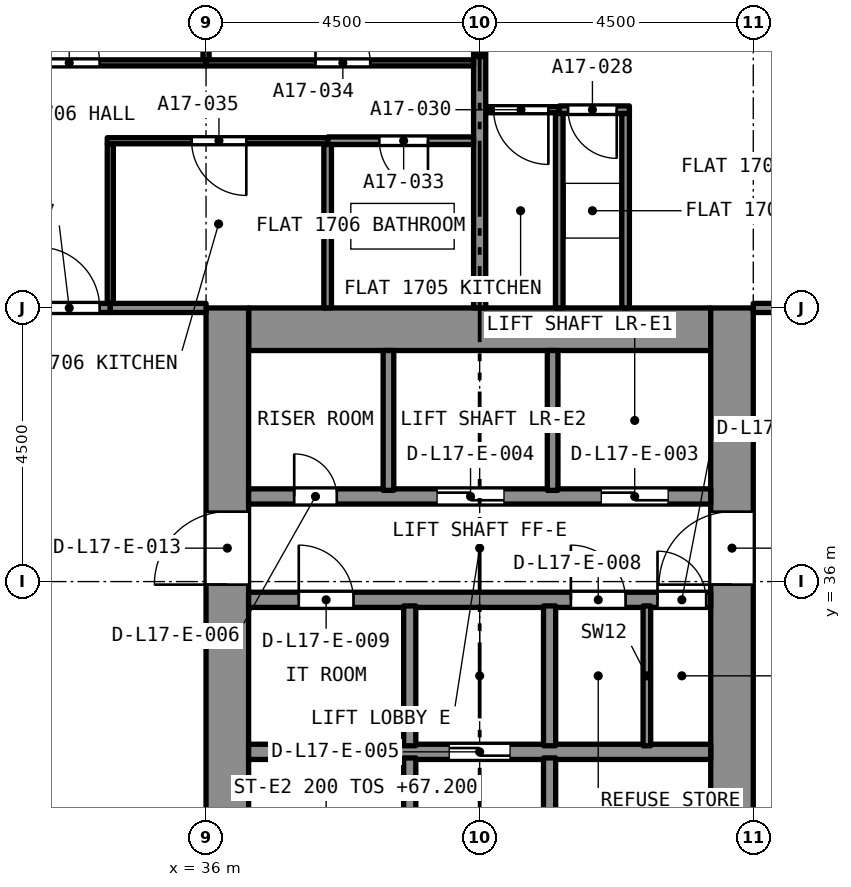
"""IFC4 building model, lengths in metres.
Left out: names, types, materials, properties, quantities, classifications, styles, units other than length and angle.
Written with IfcOpenShell. Run it as: python <this file> out.ifc"""

import sys

from ifc_helpers import new_model, si_unit, direction, frame, frame_2d, origin, place, context, subcontext, project, spatial, rectangle, extrude, element, fill, save


model = new_model("IFC4")
c1 = context("Model", 3, precision=1e-05, world=origin(), true_north=direction((0.0, 1.0)))
c2 = subcontext(c1, "Body", "Model", "MODEL_VIEW")
j1 = project(units=[si_unit("LENGTHUNIT", "METRE"), si_unit("PLANEANGLEUNIT", "RADIAN")], contexts=[c1])
p1 = place(None, origin())
s1 = spatial("IfcSite", under=j1, at=p1, CompositionType="ELEMENT")
p2 = place(p1, origin())
s2 = spatial("IfcBuilding", under=s1, at=p2, CompositionType="ELEMENT")
p3 = place(p2, frame((0.0, 0.0, 65.6)))
s3 = spatial("IfcBuildingStorey", under=s2, at=p3, CompositionType="ELEMENT", Elevation=65.6)
p4 = place(p3, frame((36.7, 40.15, 0.0), z_axis=(0.0, 0.0, 1.0), x_axis=(1.0, 0.0, 0.0)))
e1 = element("IfcWall", 1, at=p4, inside=s3, PredefinedType="SOLIDWALL", context=c2, shape_type="SweptSolid", body=[
    extrude(rectangle(XDim=7.6, YDim=0.7, at=frame_2d((3.8, 0.0))), origin(), (0.0, 0.0, 1.0), 3.2),
])
p5 = place(p3, frame((36.35, 27.0, 0.0), z_axis=(0.0, 0.0, 1.0), x_axis=(0.0, 1.0, 0.0)))
e2 = element("IfcWall", 2, at=p5, inside=s3, PredefinedType="SOLIDWALL", context=c2, shape_type="SweptSolid", body=[
    extrude(rectangle(XDim=13.5, YDim=0.7, at=frame_2d((6.75, 0.0))), origin(), (0.0, 0.0, 1.0), 3.2),
])
p6 = place(p5, frame((8.95, 0.0, 0.0)))
e3 = element("IfcOpeningElement", 3, at=p6, cuts=e2, PredefinedType="OPENING", context=c2, shape_type="SweptSolid", body=[
    extrude(rectangle(XDim=1.2, YDim=2.1, at=frame_2d((0.6, 1.05))), frame((0.0, 0.36, 0.0), z_axis=(0.0, -1.0, 0.0), x_axis=(1.0, 0.0, 0.0)), (0.0, 0.0, 1.0), 0.72),
])
p7 = place(p3, frame((44.65, 27.0, 0.0), z_axis=(0.0, 0.0, 1.0), x_axis=(0.0, 1.0, 0.0)))
e4 = element("IfcWall", 4, at=p7, inside=s3, PredefinedType="SOLIDWALL", context=c2, shape_type="SweptSolid", body=[
    extrude(rectangle(XDim=13.5, YDim=0.7, at=frame_2d((6.75, 0.0))), origin(), (0.0, 0.0, 1.0), 3.2),
])
p8 = place(p7, frame((8.95, 0.0, 0.0)))
e5 = element("IfcOpeningElement", 5, at=p8, cuts=e4, PredefinedType="OPENING", context=c2, shape_type="SweptSolid", body=[
    extrude(rectangle(XDim=1.2, YDim=2.1, at=frame_2d((0.6, 1.05))), frame((0.0, 0.36, 0.0), z_axis=(0.0, -1.0, 0.0), x_axis=(1.0, 0.0, 0.0)), (0.0, 0.0, 1.0), 0.72),
])
p9 = place(p3, frame((42.962, 43.76, 0.0), z_axis=(0.0, 0.0, 1.0), x_axis=(-1.0, 0.0, 0.0)))
e6 = element("IfcWall", 6, at=p9, inside=s3, PredefinedType="PARTITIONING", context=c2, shape_type="SweptSolid", body=[
    extrude(rectangle(XDim=1.153, YDim=0.125, at=frame_2d((0.577, 0.0))), origin(), (0.0, 0.0, 1.0), 2.9),
])
p10 = place(p9, frame((0.208, 0.0, 0.0)))
e7 = element("IfcOpeningElement", 7, at=p10, cuts=e6, PredefinedType="OPENING", context=c2, shape_type="SweptSolid", body=[
    extrude(rectangle(XDim=0.8, YDim=2.1, at=frame_2d((0.4, 1.05))), frame((0.0, 0.073, 0.0), z_axis=(0.0, -1.0, 0.0), x_axis=(1.0, 0.0, 0.0)), (0.0, 0.0, 1.0), 0.145),
])
for number, where, z_axis, x_axis in (
    (8, (42.9, 40.5, 0.0), (0.0, 0.0, 1.0), (0.0, 1.0, 0.0)),
    (9, (41.809, 40.5, 0.0), (0.0, 0.0, 1.0), (0.0, 1.0, 0.0)),
):
    element("IfcWall", number, at=place(p3, frame(where, z_axis=z_axis, x_axis=x_axis)), inside=s3, PredefinedType="PARTITIONING", context=c2, shape_type="SweptSolid", body=[
        extrude(rectangle(XDim=3.198, YDim=0.125, at=frame_2d((1.599, 0.0))), origin(), (0.0, 0.0, 1.0), 2.9),
    ])
p11 = place(p3, frame((41.809, 43.76, 0.0), z_axis=(0.0, 0.0, 1.0), x_axis=(-1.0, 0.0, 0.0)))
e10 = element("IfcWall", 10, at=p11, inside=s3, PredefinedType="PARTITIONING", context=c2, shape_type="SweptSolid", body=[
    extrude(rectangle(XDim=1.209, YDim=0.1, at=frame_2d((0.604, 0.0))), origin(), (0.0, 0.0, 1.0), 2.9),
])
p12 = place(p11, frame((0.179, 0.0, 0.0)))
e11 = element("IfcOpeningElement", 11, at=p12, cuts=e10, PredefinedType="OPENING", context=c2, shape_type="SweptSolid", body=[
    extrude(rectangle(XDim=0.9, YDim=2.1, at=frame_2d((0.45, 1.05))), frame((0.0, 0.06, 0.0), z_axis=(0.0, -1.0, 0.0), x_axis=(1.0, 0.0, 0.0)), (0.0, 0.0, 1.0), 0.12),
])
p13 = place(p3, frame((45.0, 40.5, 0.0), z_axis=(0.0, 0.0, 1.0), x_axis=(1.0, 0.0, 0.0)))
e12 = element("IfcWall", 12, at=p13, inside=s3, PredefinedType="PARTITIONING", context=c2, shape_type="SweptSolid", body=[
    extrude(rectangle(XDim=3.8, YDim=0.15, at=frame_2d((1.9, 0.0))), origin(), (0.0, 0.0, 1.0), 2.9),
])
p14 = place(p13, frame((1.75, 0.0, 0.0)))
e13 = element("IfcOpeningElement", 13, at=p14, cuts=e12, PredefinedType="OPENING", context=c2, shape_type="SweptSolid", body=[
    extrude(rectangle(XDim=1.0, YDim=2.1, at=frame_2d((0.5, 1.05))), frame((0.0, 0.085, 0.0), z_axis=(0.0, -1.0, 0.0), x_axis=(1.0, 0.0, 0.0)), (0.0, 0.0, 1.0), 0.17),
])
p15 = place(p3, frame((40.5, 40.5, 0.0), z_axis=(0.0, 0.0, 1.0), x_axis=(0.0, 1.0, 0.0)))
e14 = element("IfcWall", 14, at=p15, inside=s3, PredefinedType="PARTITIONING", context=c2, shape_type="SweptSolid", body=[
    extrude(rectangle(XDim=8.3, YDim=0.2, at=frame_2d((4.15, 0.0))), origin(), (0.0, 0.0, 1.0), 2.9),
])
p16 = place(p3, frame((40.4, 43.25, 0.0), z_axis=(0.0, 0.0, 1.0), x_axis=(-1.0, 0.0, 0.0)))
e15 = element("IfcWall", 15, at=p16, inside=s3, PredefinedType="PARTITIONING", context=c2, shape_type="SweptSolid", body=[
    extrude(rectangle(XDim=2.4, YDim=0.125, at=frame_2d((1.2, 0.0))), origin(), (0.0, 0.0, 1.0), 2.9),
])
p17 = place(p16, frame((0.75, 0.0, 0.0)))
e16 = element("IfcOpeningElement", 16, at=p17, cuts=e15, PredefinedType="OPENING", context=c2, shape_type="SweptSolid", body=[
    extrude(rectangle(XDim=0.8, YDim=2.1, at=frame_2d((0.4, 1.05))), frame((0.0, 0.073, 0.0), z_axis=(0.0, -1.0, 0.0), x_axis=(1.0, 0.0, 0.0)), (0.0, 0.0, 1.0), 0.145),
])
p18 = place(p3, frame((38.0, 40.5, 0.0), z_axis=(0.0, 0.0, 1.0), x_axis=(0.0, 1.0, 0.0)))
e17 = element("IfcWall", 17, at=p18, inside=s3, PredefinedType="PARTITIONING", context=c2, shape_type="SweptSolid", body=[
    extrude(rectangle(XDim=2.688, YDim=0.125, at=frame_2d((1.344, 0.0))), origin(), (0.0, 0.0, 1.0), 2.9),
])
p19 = place(p3, frame((36.0, 44.53, 0.0), z_axis=(0.0, 0.0, 1.0), x_axis=(1.0, 0.0, 0.0)))
e18 = element("IfcWall", 18, at=p19, inside=s3, PredefinedType="PARTITIONING", context=c2, shape_type="SweptSolid", body=[
    extrude(rectangle(XDim=4.4, YDim=0.1, at=frame_2d((2.2, 0.0))), origin(), (0.0, 0.0, 1.0), 2.9),
])
p20 = place(p19, frame((1.8, 0.0, 0.0)))
e19 = element("IfcOpeningElement", 19, at=p20, cuts=e18, PredefinedType="OPENING", context=c2, shape_type="SweptSolid", body=[
    extrude(rectangle(XDim=0.9, YDim=2.1, at=frame_2d((0.45, 1.05))), frame((0.0, 0.06, 0.0), z_axis=(0.0, -1.0, 0.0), x_axis=(1.0, 0.0, 0.0)), (0.0, 0.0, 1.0), 0.12),
])
p21 = place(p3, frame((36.0, 44.58, 0.0), z_axis=(0.0, 0.0, 1.0), x_axis=(0.0, 1.0, 0.0)))
e20 = element("IfcWall", 20, at=p21, inside=s3, PredefinedType="PARTITIONING", context=c2, shape_type="SweptSolid", body=[
    extrude(rectangle(XDim=4.22, YDim=0.1, at=frame_2d((2.11, 0.0))), origin(), (0.0, 0.0, 1.0), 2.9),
])
p22 = place(p3, frame((38.0, 43.25, 0.0), z_axis=(0.0, 0.0, 1.0), x_axis=(-1.0, 0.0, 0.0)))
e21 = element("IfcWall", 21, at=p22, inside=s3, PredefinedType="PARTITIONING", context=c2, shape_type="SweptSolid", body=[
    extrude(rectangle(XDim=3.625, YDim=0.1, at=frame_2d((1.812, 0.0))), origin(), (0.0, 0.0, 1.0), 2.9),
])
p23 = place(p22, frame((1.337, 0.0, 0.0)))
e22 = element("IfcOpeningElement", 22, at=p23, cuts=e21, PredefinedType="OPENING", context=c2, shape_type="SweptSolid", body=[
    extrude(rectangle(XDim=0.9, YDim=2.1, at=frame_2d((0.45, 1.05))), frame((0.0, 0.06, 0.0), z_axis=(0.0, -1.0, 0.0), x_axis=(1.0, 0.0, 0.0)), (0.0, 0.0, 1.0), 0.12),
])
p24 = place(p3, frame((34.425, 40.575, 0.0), z_axis=(0.0, 0.0, 1.0), x_axis=(0.0, 1.0, 0.0)))
e23 = element("IfcWall", 23, at=p24, inside=s3, PredefinedType="PARTITIONING", context=c2, shape_type="SweptSolid", body=[
    extrude(rectangle(XDim=2.625, YDim=0.1, at=frame_2d((1.312, 0.0))), origin(), (0.0, 0.0, 1.0), 2.9),
])
p25 = place(p3, frame((32.2, 44.53, 0.0), z_axis=(0.0, 0.0, 1.0), x_axis=(1.0, 0.0, 0.0)))
e24 = element("IfcWall", 24, at=p25, inside=s3, PredefinedType="PARTITIONING", context=c2, shape_type="SweptSolid", body=[
    extrude(rectangle(XDim=3.8, YDim=0.1, at=frame_2d((1.9, 0.0))), origin(), (0.0, 0.0, 1.0), 2.9),
])
p26 = place(p25, frame((1.05, 0.0, 0.0)))
e25 = element("IfcOpeningElement", 25, at=p26, cuts=e24, PredefinedType="OPENING", context=c2, shape_type="SweptSolid", body=[
    extrude(rectangle(XDim=1.0, YDim=2.1, at=frame_2d((0.5, 1.05))), frame((0.0, 0.06, 0.0), z_axis=(0.0, -1.0, 0.0), x_axis=(1.0, 0.0, 0.0)), (0.0, 0.0, 1.0), 0.12),
])
p27 = place(p3, frame((32.2, 40.5, 0.0), z_axis=(0.0, 0.0, 1.0), x_axis=(1.0, 0.0, 0.0)))
e26 = element("IfcWall", 26, at=p27, inside=s3, PredefinedType="PARTITIONING", context=c2, shape_type="SweptSolid", body=[
    extrude(rectangle(XDim=2.225, YDim=0.15, at=frame_2d((1.113, 0.0))), origin(), (0.0, 0.0, 1.0), 2.9),
])
p28 = place(p27, frame((1.05, 0.0, 0.0)))
e27 = element("IfcOpeningElement", 27, at=p28, cuts=e26, PredefinedType="OPENING", context=c2, shape_type="SweptSolid", body=[
    extrude(rectangle(XDim=1.0, YDim=2.1, at=frame_2d((0.5, 1.05))), frame((0.0, 0.085, 0.0), z_axis=(0.0, -1.0, 0.0), x_axis=(1.0, 0.0, 0.0)), (0.0, 0.0, 1.0), 0.17),
])
p29 = place(p3, frame((34.425, 40.5, 0.0), z_axis=(0.0, 0.0, 1.0), x_axis=(1.0, 0.0, 0.0)))
e28 = element("IfcWall", 28, at=p29, inside=s3, PredefinedType="PARTITIONING", context=c2, shape_type="SweptSolid", body=[
    extrude(rectangle(XDim=1.575, YDim=0.15, at=frame_2d((0.788, 0.0))), origin(), (0.0, 0.0, 1.0), 2.9),
])
p30 = place(p3, frame((36.7, 33.2, 0.0), z_axis=(0.0, 0.0, 1.0), x_axis=(1.0, 0.0, 0.0)))
e29 = element("IfcWall", 29, at=p30, inside=s3, PredefinedType="SOLIDWALL", context=c2, shape_type="SweptSolid", body=[
    extrude(rectangle(XDim=7.6, YDim=0.25, at=frame_2d((3.8, 0.0))), origin(), (0.0, 0.0, 1.0), 2.9),
])
p31 = place(p30, frame((3.3, 0.0, 0.0)))
e30 = element("IfcOpeningElement", 30, at=p31, cuts=e29, PredefinedType="OPENING", context=c2, shape_type="SweptSolid", body=[
    extrude(rectangle(XDim=1.0, YDim=2.1, at=frame_2d((0.5, 1.05))), frame((0.0, 0.135, 0.0), z_axis=(0.0, -1.0, 0.0), x_axis=(1.0, 0.0, 0.0)), (0.0, 0.0, 1.0), 0.27),
])
p32 = place(p3, frame((36.7, 35.7, 0.0), z_axis=(0.0, 0.0, 1.0), x_axis=(1.0, 0.0, 0.0)))
e31 = element("IfcWall", 31, at=p32, inside=s3, PredefinedType="SOLIDWALL", context=c2, shape_type="SweptSolid", body=[
    extrude(rectangle(XDim=7.6, YDim=0.25, at=frame_2d((3.8, 0.0))), origin(), (0.0, 0.0, 1.0), 2.9),
])
p33 = place(p32, frame((6.725, 0.0, 0.0)))
e32 = element("IfcOpeningElement", 32, at=p33, cuts=e31, PredefinedType="OPENING", context=c2, shape_type="SweptSolid", body=[
    extrude(rectangle(XDim=0.8, YDim=2.1, at=frame_2d((0.4, 1.05))), frame((0.0, 0.135, 0.0), z_axis=(0.0, -1.0, 0.0), x_axis=(1.0, 0.0, 0.0)), (0.0, 0.0, 1.0), 0.27),
])
p34 = place(p32, frame((5.3, 0.0, 0.0)))
e33 = element("IfcOpeningElement", 33, at=p34, cuts=e31, PredefinedType="OPENING", context=c2, shape_type="SweptSolid", body=[
    extrude(rectangle(XDim=0.9, YDim=2.1, at=frame_2d((0.45, 1.05))), frame((0.0, 0.135, 0.0), z_axis=(0.0, -1.0, 0.0), x_axis=(1.0, 0.0, 0.0)), (0.0, 0.0, 1.0), 0.27),
])
p35 = place(p32, frame((0.825, 0.0, 0.0)))
e34 = element("IfcOpeningElement", 34, at=p35, cuts=e31, PredefinedType="OPENING", context=c2, shape_type="SweptSolid", body=[
    extrude(rectangle(XDim=0.9, YDim=2.1, at=frame_2d((0.45, 1.05))), frame((0.0, 0.135, 0.0), z_axis=(0.0, -1.0, 0.0), x_axis=(1.0, 0.0, 0.0)), (0.0, 0.0, 1.0), 0.27),
])
p36 = place(p3, frame((36.7, 37.4, 0.0), z_axis=(0.0, 0.0, 1.0), x_axis=(1.0, 0.0, 0.0)))
e35 = element("IfcWall", 35, at=p36, inside=s3, PredefinedType="SOLIDWALL", context=c2, shape_type="SweptSolid", body=[
    extrude(rectangle(XDim=7.6, YDim=0.25, at=frame_2d((3.8, 0.0))), origin(), (0.0, 0.0, 1.0), 2.9),
])
p37 = place(p36, frame((5.8, 0.0, 0.0)))
e36 = element("IfcOpeningElement", 36, at=p37, cuts=e35, PredefinedType="OPENING", context=c2, shape_type="SweptSolid", body=[
    extrude(rectangle(XDim=1.1, YDim=2.4, at=frame_2d((0.55, 1.2))), frame((0.0, 0.135, 0.0), z_axis=(0.0, -1.0, 0.0), x_axis=(1.0, 0.0, 0.0)), (0.0, 0.0, 1.0), 0.27),
])
p38 = place(p36, frame((3.1, 0.0, 0.0)))
e37 = element("IfcOpeningElement", 37, at=p38, cuts=e35, PredefinedType="OPENING", context=c2, shape_type="SweptSolid", body=[
    extrude(rectangle(XDim=1.1, YDim=2.4, at=frame_2d((0.55, 1.2))), frame((0.0, 0.135, 0.0), z_axis=(0.0, -1.0, 0.0), x_axis=(1.0, 0.0, 0.0)), (0.0, 0.0, 1.0), 0.27),
])
p39 = place(p36, frame((0.75, 0.0, 0.0)))
e38 = element("IfcOpeningElement", 38, at=p39, cuts=e35, PredefinedType="OPENING", context=c2, shape_type="SweptSolid", body=[
    extrude(rectangle(XDim=0.7, YDim=2.1, at=frame_2d((0.35, 1.05))), frame((0.0, 0.135, 0.0), z_axis=(0.0, -1.0, 0.0), x_axis=(1.0, 0.0, 0.0)), (0.0, 0.0, 1.0), 0.27),
])
p40 = place(p3, frame((41.65, 27.7, 0.0), z_axis=(0.0, 0.0, 1.0), x_axis=(0.0, 1.0, 0.0)))
e39 = element("IfcWall", 39, at=p40, inside=s3, PredefinedType="SOLIDWALL", context=c2, shape_type="SweptSolid", body=[
    extrude(rectangle(XDim=5.4, YDim=0.2, at=frame_2d((2.7, 0.0))), origin(), (0.0, 0.0, 1.0), 2.9),
])
p41 = place(p40, frame((0.2, 0.0, 0.0)))
e40 = element("IfcOpeningElement", 40, at=p41, cuts=e39, PredefinedType="OPENING", context=c2, shape_type="SweptSolid", body=[
    extrude(rectangle(XDim=0.9, YDim=2.1, at=frame_2d((0.45, 1.05))), frame((0.0, 0.11, 0.0), z_axis=(0.0, -1.0, 0.0), x_axis=(1.0, 0.0, 0.0)), (0.0, 0.0, 1.0), 0.22),
])
p42 = place(p3, frame((39.35, 27.7, 0.0), z_axis=(0.0, 0.0, 1.0), x_axis=(0.0, 1.0, 0.0)))
e41 = element("IfcWall", 41, at=p42, inside=s3, PredefinedType="SOLIDWALL", context=c2, shape_type="SweptSolid", body=[
    extrude(rectangle(XDim=5.4, YDim=0.2, at=frame_2d((2.7, 0.0))), origin(), (0.0, 0.0, 1.0), 2.9),
])
p43 = place(p42, frame((0.2, 0.0, 0.0)))
e42 = element("IfcOpeningElement", 42, at=p43, cuts=e41, PredefinedType="OPENING", context=c2, shape_type="SweptSolid", body=[
    extrude(rectangle(XDim=0.9, YDim=2.1, at=frame_2d((0.45, 1.05))), frame((0.0, 0.11, 0.0), z_axis=(0.0, -1.0, 0.0), x_axis=(1.0, 0.0, 0.0)), (0.0, 0.0, 1.0), 0.22),
])
for number, where, z_axis, x_axis in (
    (43, (41.65, 33.3, 0.0), (0.0, 0.0, 1.0), (0.0, 1.0, 0.0)),
    (44, (39.35, 33.3, 0.0), (0.0, 0.0, 1.0), (0.0, 1.0, 0.0)),
):
    element("IfcWall", number, at=place(p3, frame(where, z_axis=z_axis, x_axis=x_axis)), inside=s3, PredefinedType="SOLIDWALL", context=c2, shape_type="SweptSolid", body=[
        extrude(rectangle(XDim=2.3, YDim=0.2, at=frame_2d((1.15, 0.0))), origin(), (0.0, 0.0, 1.0), 2.9),
    ])
for number, where, z_axis, x_axis in (
    (45, (41.7, 37.5, 0.0), (0.0, 0.0, 1.0), (0.0, 1.0, 0.0)),
    (46, (39.0, 37.5, 0.0), (0.0, 0.0, 1.0), (0.0, 1.0, 0.0)),
):
    element("IfcWall", number, at=place(p3, frame(where, z_axis=z_axis, x_axis=x_axis)), inside=s3, PredefinedType="SOLIDWALL", context=c2, shape_type="SweptSolid", body=[
        extrude(rectangle(XDim=2.3, YDim=0.175, at=frame_2d((1.15, 0.0))), origin(), (0.0, 0.0, 1.0), 2.9),
    ])
p44 = place(p3, frame((43.25, 33.3, 0.0), z_axis=(0.0, 0.0, 1.0), x_axis=(0.0, 1.0, 0.0)))
e47 = element("IfcWall", 47, at=p44, inside=s3, PredefinedType="PARTITIONING", context=c2, shape_type="SweptSolid", body=[
    extrude(rectangle(XDim=2.3, YDim=0.125, at=frame_2d((1.15, 0.0))), origin(), (0.0, 0.0, 1.0), 2.9),
])
p45 = place(p10, origin())
e48 = element("IfcDoor", 48, at=p45, inside=s3, OperationType="SINGLE_SWING_RIGHT", PredefinedType="DOOR", context=c2, shape_type="SweptSolid", body=[
    extrude(rectangle(XDim=0.8, YDim=2.1, at=frame_2d((0.4, 1.05))), frame((0.0, 0.025, 0.0), z_axis=(0.0, -1.0, 0.0), x_axis=(1.0, 0.0, 0.0)), (0.0, 0.0, 1.0), 0.05),
])
fill(e7, e48)
p46 = place(p12, origin())
e49 = element("IfcDoor", 49, at=p46, inside=s3, OperationType="SINGLE_SWING_RIGHT", PredefinedType="DOOR", context=c2, shape_type="SweptSolid", body=[
    extrude(rectangle(XDim=0.9, YDim=2.1, at=frame_2d((0.45, 1.05))), frame((0.0, 0.025, 0.0), z_axis=(0.0, -1.0, 0.0), x_axis=(1.0, 0.0, 0.0)), (0.0, 0.0, 1.0), 0.05),
])
fill(e11, e49)
p47 = place(p17, origin())
e50 = element("IfcDoor", 50, at=p47, inside=s3, OperationType="SINGLE_SWING_LEFT", PredefinedType="DOOR", context=c2, shape_type="SweptSolid", body=[
    extrude(rectangle(XDim=0.8, YDim=2.1, at=frame_2d((0.4, 1.05))), frame((0.0, 0.025, 0.0), z_axis=(0.0, -1.0, 0.0), x_axis=(1.0, 0.0, 0.0)), (0.0, 0.0, 1.0), 0.05),
])
fill(e16, e50)
p48 = place(p20, origin())
e51 = element("IfcDoor", 51, at=p48, inside=s3, OperationType="SINGLE_SWING_RIGHT", PredefinedType="DOOR", context=c2, shape_type="SweptSolid", body=[
    extrude(rectangle(XDim=0.9, YDim=2.1, at=frame_2d((0.45, 1.05))), frame((0.0, 0.025, 0.0), z_axis=(0.0, -1.0, 0.0), x_axis=(1.0, 0.0, 0.0)), (0.0, 0.0, 1.0), 0.05),
])
fill(e19, e51)
p49 = place(p23, origin())
e52 = element("IfcDoor", 52, at=p49, inside=s3, OperationType="SINGLE_SWING_LEFT", PredefinedType="DOOR", context=c2, shape_type="SweptSolid", body=[
    extrude(rectangle(XDim=0.9, YDim=2.1, at=frame_2d((0.45, 1.05))), frame((0.0, 0.025, 0.0), z_axis=(0.0, -1.0, 0.0), x_axis=(1.0, 0.0, 0.0)), (0.0, 0.0, 1.0), 0.05),
])
fill(e22, e52)
p50 = place(p26, origin())
e53 = element("IfcDoor", 53, at=p50, inside=s3, OperationType="SINGLE_SWING_LEFT", PredefinedType="DOOR", context=c2, shape_type="SweptSolid", body=[
    extrude(rectangle(XDim=1.0, YDim=2.1, at=frame_2d((0.5, 1.05))), frame((0.0, 0.025, 0.0), z_axis=(0.0, -1.0, 0.0), x_axis=(1.0, 0.0, 0.0)), (0.0, 0.0, 1.0), 0.05),
])
fill(e25, e53)
p51 = place(p28, origin())
e54 = element("IfcDoor", 54, at=p51, inside=s3, OperationType="SINGLE_SWING_RIGHT", PredefinedType="DOOR", context=c2, shape_type="SweptSolid", body=[
    extrude(rectangle(XDim=1.0, YDim=2.1, at=frame_2d((0.5, 1.05))), frame((0.0, 0.025, 0.0), z_axis=(0.0, -1.0, 0.0), x_axis=(1.0, 0.0, 0.0)), (0.0, 0.0, 1.0), 0.05),
])
fill(e27, e54)
p52 = place(p37, origin())
e55 = element("IfcDoor", 55, at=p52, inside=s3, OperationType="SLIDING_TO_LEFT", PredefinedType="DOOR", context=c2, shape_type="SweptSolid", body=[
    extrude(rectangle(XDim=1.1, YDim=2.4, at=frame_2d((0.55, 1.2))), frame((0.0, 0.025, 0.0), z_axis=(0.0, -1.0, 0.0), x_axis=(1.0, 0.0, 0.0)), (0.0, 0.0, 1.0), 0.05),
])
fill(e36, e55)
p53 = place(p38, origin())
e56 = element("IfcDoor", 56, at=p53, inside=s3, OperationType="SLIDING_TO_LEFT", PredefinedType="DOOR", context=c2, shape_type="SweptSolid", body=[
    extrude(rectangle(XDim=1.1, YDim=2.4, at=frame_2d((0.55, 1.2))), frame((0.0, 0.025, 0.0), z_axis=(0.0, -1.0, 0.0), x_axis=(1.0, 0.0, 0.0)), (0.0, 0.0, 1.0), 0.05),
])
fill(e37, e56)
p54 = place(p31, origin())
e57 = element("IfcDoor", 57, at=p54, inside=s3, OperationType="SLIDING_TO_LEFT", PredefinedType="DOOR", context=c2, shape_type="SweptSolid", body=[
    extrude(rectangle(XDim=1.0, YDim=2.1, at=frame_2d((0.5, 1.05))), frame((0.0, 0.025, 0.0), z_axis=(0.0, -1.0, 0.0), x_axis=(1.0, 0.0, 0.0)), (0.0, 0.0, 1.0), 0.05),
])
fill(e30, e57)
p55 = place(p39, origin())
e58 = element("IfcDoor", 58, at=p55, inside=s3, OperationType="SINGLE_SWING_LEFT", PredefinedType="DOOR", context=c2, shape_type="SweptSolid", body=[
    extrude(rectangle(XDim=0.7, YDim=2.1, at=frame_2d((0.35, 1.05))), frame((0.0, 0.025, 0.0), z_axis=(0.0, -1.0, 0.0), x_axis=(1.0, 0.0, 0.0)), (0.0, 0.0, 1.0), 0.05),
])
fill(e38, e58)
p56 = place(p33, origin())
e59 = element("IfcDoor", 59, at=p56, inside=s3, OperationType="SINGLE_SWING_LEFT", PredefinedType="DOOR", context=c2, shape_type="SweptSolid", body=[
    extrude(rectangle(XDim=0.8, YDim=2.1, at=frame_2d((0.4, 1.05))), frame((0.0, 0.025, 0.0), z_axis=(0.0, -1.0, 0.0), x_axis=(1.0, 0.0, 0.0)), (0.0, 0.0, 1.0), 0.05),
])
fill(e32, e59)
p57 = place(p34, origin())
e60 = element("IfcDoor", 60, at=p57, inside=s3, OperationType="SINGLE_SWING_LEFT", PredefinedType="DOOR", context=c2, shape_type="SweptSolid", body=[
    extrude(rectangle(XDim=0.9, YDim=2.1, at=frame_2d((0.45, 1.05))), frame((0.0, 0.025, 0.0), z_axis=(0.0, -1.0, 0.0), x_axis=(1.0, 0.0, 0.0)), (0.0, 0.0, 1.0), 0.05),
])
fill(e33, e60)
p58 = place(p35, origin())
e61 = element("IfcDoor", 61, at=p58, inside=s3, OperationType="SINGLE_SWING_LEFT", PredefinedType="DOOR", context=c2, shape_type="SweptSolid", body=[
    extrude(rectangle(XDim=0.9, YDim=2.1, at=frame_2d((0.45, 1.05))), frame((0.0, 0.025, 0.0), z_axis=(0.0, -1.0, 0.0), x_axis=(1.0, 0.0, 0.0)), (0.0, 0.0, 1.0), 0.05),
])
fill(e34, e61)
p59 = place(p6, origin())
e62 = element("IfcDoor", 62, at=p59, inside=s3, OperationType="SINGLE_SWING_LEFT", PredefinedType="DOOR", context=c2, shape_type="SweptSolid", body=[
    extrude(rectangle(XDim=1.2, YDim=2.1, at=frame_2d((0.6, 1.05))), frame((0.0, 0.025, 0.0), z_axis=(0.0, -1.0, 0.0), x_axis=(1.0, 0.0, 0.0)), (0.0, 0.0, 1.0), 0.05),
])
fill(e3, e62)
p60 = place(p8, origin())
e63 = element("IfcDoor", 63, at=p60, inside=s3, OperationType="SINGLE_SWING_LEFT", PredefinedType="DOOR", context=c2, shape_type="SweptSolid", body=[
    extrude(rectangle(XDim=1.2, YDim=2.1, at=frame_2d((0.6, 1.05))), frame((0.0, 0.025, 0.0), z_axis=(0.0, -1.0, 0.0), x_axis=(1.0, 0.0, 0.0)), (0.0, 0.0, 1.0), 0.05),
])
fill(e5, e63)
save(model, sys.argv[1])
